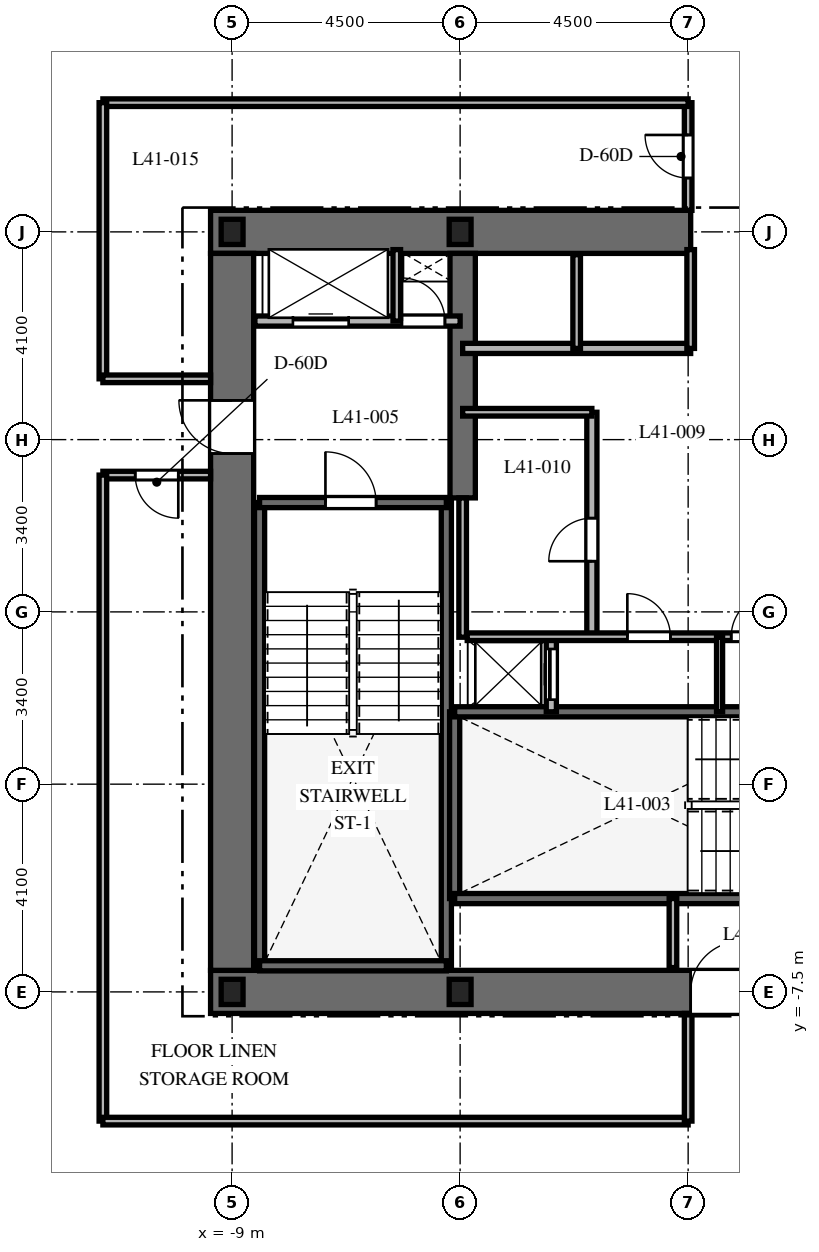
"""IFC4 building model, lengths in metres.
Left out: names, types, materials, properties, quantities, classifications, styles, units other than length and angle.
Written with IfcOpenShell. Run it as: python <this file> out.ifc"""

import sys

from ifc_helpers import new_model, si_unit, direction, frame, frame_2d, origin, origin_2d, place, context, subcontext, project, spatial, rectangle, i_section, extrude, element, fill, save


model = new_model("IFC4")
c1 = context("Model", 3, precision=1e-05, world=origin(), true_north=direction((0.0, 1.0)))
c2 = subcontext(c1, "Body", "Model", "MODEL_VIEW")
j1 = project(units=[si_unit("LENGTHUNIT", "METRE"), si_unit("PLANEANGLEUNIT", "RADIAN")], contexts=[c1])
p1 = place(None, origin())
s1 = spatial("IfcSite", under=j1, at=p1, CompositionType="ELEMENT")
p2 = place(p1, origin())
s2 = spatial("IfcBuilding", under=s1, at=p2, CompositionType="ELEMENT")
p3 = place(p2, frame((0.0, 0.0, 166.5)))
s3 = spatial("IfcBuildingStorey", under=s2, at=p3, CompositionType="ELEMENT", Elevation=166.5)
p4 = place(p3, frame((-9.425, -7.5, 0.0), z_axis=(0.0, 0.0, 1.0), x_axis=(1.0, 0.0, 0.0)))
e1 = element("IfcWall", 1, at=p4, inside=s3, PredefinedType="SHEAR", context=c2, shape_type="SweptSolid", body=[
    extrude(rectangle(XDim=18.85, YDim=0.85, at=frame_2d((9.425, 0.0))), origin(), (0.0, 0.0, 1.0), 3.7),
])
p5 = place(p4, frame((9.475, 0.0, 0.0)))
e2 = element("IfcOpeningElement", 2, at=p5, cuts=e1, PredefinedType="OPENING", context=c2, shape_type="SweptSolid", body=[
    extrude(rectangle(XDim=1.0, YDim=2.15, at=frame_2d((0.5, 1.075))), frame((0.0, 0.435, 0.0), z_axis=(0.0, -1.0, 0.0), x_axis=(1.0, 0.0, 0.0)), (0.0, 0.0, 1.0), 0.87),
])
p6 = place(p3, frame((-9.425, 7.5, 0.0), z_axis=(0.0, 0.0, 1.0), x_axis=(1.0, 0.0, 0.0)))
e3 = element("IfcWall", 3, at=p6, inside=s3, PredefinedType="SHEAR", context=c2, shape_type="SweptSolid", body=[
    extrude(rectangle(XDim=9.475, YDim=0.85, at=frame_2d((4.738, 0.0))), origin(), (0.0, 0.0, 1.0), 3.7),
])
p7 = place(p3, frame((-9.0, -7.075, 0.0), z_axis=(0.0, 0.0, 1.0), x_axis=(0.0, 1.0, 0.0)))
e4 = element("IfcWall", 4, at=p7, inside=s3, PredefinedType="SHEAR", context=c2, shape_type="SweptSolid", body=[
    extrude(rectangle(XDim=14.15, YDim=0.85, at=frame_2d((7.075, 0.0))), origin(), (0.0, 0.0, 1.0), 3.7),
])
p8 = place(p7, frame((10.2, 0.0, 0.0)))
e5 = element("IfcOpeningElement", 5, at=p8, cuts=e4, PredefinedType="OPENING", context=c2, shape_type="SweptSolid", body=[
    extrude(rectangle(XDim=1.05, YDim=2.15, at=frame_2d((0.525, 1.075))), frame((0.0, 0.435, 0.0), z_axis=(0.0, -1.0, 0.0), x_axis=(1.0, 0.0, 0.0)), (0.0, 0.0, 1.0), 0.87),
])
p9 = place(p3, frame((-4.45, 2.25, 0.0), z_axis=(0.0, 0.0, 1.0), x_axis=(0.0, 1.0, 0.0)))
e6 = element("IfcWall", 6, at=p9, inside=s3, PredefinedType="SHEAR", context=c2, shape_type="SweptSolid", body=[
    extrude(rectangle(XDim=4.825, YDim=0.5, at=frame_2d((2.413, 0.0))), origin(), (0.0, 0.0, 1.0), 3.7),
])
for number, where, z_axis, x_axis in (
    (7, (-8.458, -6.985, 0.0), (0.0, 0.0, 1.0), (0.0, 1.0, 0.0)),
    (8, (-4.772, -6.985, 0.0), (0.0, 0.0, 1.0), (0.0, 1.0, 0.0)),
):
    element("IfcWall", number, at=place(p3, frame(where, z_axis=z_axis, x_axis=x_axis)), inside=s3, PredefinedType="SHEAR", context=c2, shape_type="SweptSolid", body=[
        extrude(rectangle(XDim=9.143, YDim=0.2, at=frame_2d((4.572, 0.0))), origin(), (0.0, 0.0, 1.0), 3.7),
    ])
p10 = place(p3, frame((-8.458, -6.985, 0.0), z_axis=(0.0, 0.0, 1.0), x_axis=(1.0, 0.0, 0.0)))
e9 = element("IfcWall", 9, at=p10, inside=s3, PredefinedType="SHEAR", context=c2, shape_type="SweptSolid", body=[
    extrude(rectangle(XDim=3.686, YDim=0.2, at=frame_2d((1.843, 0.0))), origin(), (0.0, 0.0, 1.0), 3.7),
])
p11 = place(p3, frame((-8.458, 2.158, 0.0), z_axis=(0.0, 0.0, 1.0), x_axis=(1.0, 0.0, 0.0)))
e10 = element("IfcWall", 10, at=p11, inside=s3, PredefinedType="SHEAR", context=c2, shape_type="SweptSolid", body=[
    extrude(rectangle(XDim=3.686, YDim=0.2, at=frame_2d((1.843, 0.0))), origin(), (0.0, 0.0, 1.0), 3.7),
])
p12 = place(p11, frame((1.3, 0.0, 0.0)))
e11 = element("IfcOpeningElement", 11, at=p12, cuts=e10, PredefinedType="OPENING", context=c2, shape_type="SweptSolid", body=[
    extrude(rectangle(XDim=1.0, YDim=2.15, at=frame_2d((0.5, 1.075))), frame((0.0, 0.11, 0.0), z_axis=(0.0, -1.0, 0.0), x_axis=(1.0, 0.0, 0.0)), (0.0, 0.0, 1.0), 0.22),
])
p13 = place(p3, frame((-4.608, -5.658, 0.0), z_axis=(0.0, 0.0, 1.0), x_axis=(0.0, 1.0, 0.0)))
e12 = element("IfcWall", 12, at=p13, inside=s3, PredefinedType="SHEAR", context=c2, shape_type="SweptSolid", body=[
    extrude(rectangle(XDim=3.686, YDim=0.2, at=frame_2d((1.843, 0.0))), origin(), (0.0, 0.0, 1.0), 3.7),
])
p14 = place(p3, frame((-4.608, -5.658, 0.0), z_axis=(0.0, 0.0, 1.0), x_axis=(1.0, 0.0, 0.0)))
e13 = element("IfcWall", 13, at=p14, inside=s3, PredefinedType="SHEAR", context=c2, shape_type="SweptSolid", body=[
    extrude(rectangle(XDim=9.166, YDim=0.2, at=frame_2d((4.583, 0.0))), origin(), (0.0, 0.0, 1.0), 3.7),
])
p15 = place(p14, frame((7.45, 0.0, 0.0)))
e14 = element("IfcOpeningElement", 14, at=p15, cuts=e13, PredefinedType="OPENING", context=c2, shape_type="SweptSolid", body=[
    extrude(rectangle(XDim=1.0, YDim=2.15, at=frame_2d((0.5, 1.075))), frame((0.0, 0.11, 0.0), z_axis=(0.0, -1.0, 0.0), x_axis=(1.0, 0.0, 0.0)), (0.0, 0.0, 1.0), 0.22),
])
p16 = place(p3, frame((-4.608, -1.972, 0.0), z_axis=(0.0, 0.0, 1.0), x_axis=(1.0, 0.0, 0.0)))
e15 = element("IfcWall", 15, at=p16, inside=s3, PredefinedType="SHEAR", context=c2, shape_type="SweptSolid", body=[
    extrude(rectangle(XDim=9.166, YDim=0.2, at=frame_2d((4.583, 0.0))), origin(), (0.0, 0.0, 1.0), 3.7),
])
for number, where, z_axis, x_axis in (
    (16, (-9.0, -7.5, 0.0), (0.0, 0.0, 1.0), (1.0, 0.0, 0.0)),
    (17, (-4.5, -7.5, 0.0), (0.0, 0.0, 1.0), (1.0, 0.0, 0.0)),
    (18, (-4.5, 7.5, 0.0), (0.0, 0.0, 1.0), (1.0, 0.0, 0.0)),
    (19, (-9.0, 7.5, 0.0), (0.0, 0.0, 1.0), (1.0, 0.0, 0.0)),
):
    element("IfcColumn", number, at=place(p3, frame(where, z_axis=z_axis, x_axis=x_axis)), inside=s3, PredefinedType="COLUMN", context=c2, shape_type="SweptSolid", body=[
        extrude(i_section(OverallWidth=0.432, OverallDepth=0.498, WebThickness=0.056, FlangeThickness=0.089, at=origin_2d()), origin(), (0.0, 0.0, 1.0), 3.7),
    ])
p17 = place(p3, frame((-0.3, -7.02, 0.0), z_axis=(0.0, 0.0, 1.0), x_axis=(0.0, 1.0, 0.0)))
e20 = element("IfcWall", 20, at=p17, inside=s3, PredefinedType="PARTITIONING", context=c2, shape_type="SweptSolid", body=[
    extrude(rectangle(XDim=1.362, YDim=0.15, at=frame_2d((0.681, 0.0))), origin(), (0.0, 0.0, 1.0), 3.38),
])
p18 = place(p3, frame((-8.55, 5.74, 0.0), z_axis=(0.0, 0.0, 1.0), x_axis=(1.0, 0.0, 0.0)))
e21 = element("IfcWall", 21, at=p18, inside=s3, PredefinedType="PARTITIONING", context=c2, shape_type="SweptSolid", body=[
    extrude(rectangle(XDim=4.05, YDim=0.2, at=frame_2d((2.025, 0.0))), origin(), (0.0, 0.0, 1.0), 3.38),
])
p19 = place(p18, frame((0.75, 0.0, 0.0)))
e22 = element("IfcOpeningElement", 22, at=p19, cuts=e21, PredefinedType="OPENING", context=c2, shape_type="SweptSolid", body=[
    extrude(rectangle(XDim=1.1, YDim=2.2, at=frame_2d((0.55, 1.1))), frame((0.0, 0.11, 0.0), z_axis=(0.0, -1.0, 0.0), x_axis=(1.0, 0.0, 0.0)), (0.0, 0.0, 1.0), 0.22),
])
p20 = place(p18, frame((2.9, 0.0, 0.0)))
e23 = element("IfcOpeningElement", 23, at=p20, cuts=e21, PredefinedType="OPENING", context=c2, shape_type="SweptSolid", body=[
    extrude(rectangle(XDim=0.85, YDim=2.03, at=frame_2d((0.425, 1.015))), frame((0.0, 0.11, 0.0), z_axis=(0.0, -1.0, 0.0), x_axis=(1.0, 0.0, 0.0)), (0.0, 0.0, 1.0), 0.22),
])
p21 = place(p3, frame((-5.75, 5.74, 0.0), z_axis=(0.0, 0.0, 1.0), x_axis=(0.0, 1.0, 0.0)))
e24 = element("IfcWall", 24, at=p21, inside=s3, PredefinedType="PARTITIONING", context=c2, shape_type="SweptSolid", body=[
    extrude(rectangle(XDim=1.41, YDim=0.15, at=frame_2d((0.705, 0.0))), origin(), (0.0, 0.0, 1.0), 3.38),
])
p22 = place(p3, frame((-2.7, -1.972, 0.0), z_axis=(0.0, 0.0, 1.0), x_axis=(0.0, 1.0, 0.0)))
e25 = element("IfcWall", 25, at=p22, inside=s3, PredefinedType="PARTITIONING", context=c2, shape_type="SweptSolid", body=[
    extrude(rectangle(XDim=1.472, YDim=0.2, at=frame_2d((0.736, 0.0))), origin(), (0.0, 0.0, 1.0), 3.38),
])
p23 = place(p22, frame((0.24, 0.0, 0.0)))
e26 = element("IfcOpeningElement", 26, at=p23, cuts=e25, PredefinedType="OPENING", context=c2, shape_type="SweptSolid", body=[
    extrude(rectangle(XDim=1.0, YDim=2.2, at=frame_2d((0.5, 1.1))), frame((0.0, 0.11, 0.0), z_axis=(0.0, -1.0, 0.0), x_axis=(1.0, 0.0, 0.0)), (0.0, 0.0, 1.0), 0.22),
])
p24 = place(p3, frame((-4.45, 5.2, 0.0), z_axis=(0.0, 0.0, 1.0), x_axis=(1.0, 0.0, 0.0)))
e27 = element("IfcWall", 27, at=p24, inside=s3, PredefinedType="PARTITIONING", context=c2, shape_type="SweptSolid", body=[
    extrude(rectangle(XDim=4.5, YDim=0.2, at=frame_2d((2.25, 0.0))), origin(), (0.0, 0.0, 1.0), 3.38),
])
p25 = place(p3, frame((-2.2, 5.2, 0.0), z_axis=(0.0, 0.0, 1.0), x_axis=(0.0, 1.0, 0.0)))
e28 = element("IfcWall", 28, at=p25, inside=s3, PredefinedType="PARTITIONING", context=c2, shape_type="SweptSolid", body=[
    extrude(rectangle(XDim=1.85, YDim=0.15, at=frame_2d((0.925, 0.0))), origin(), (0.0, 0.0, 1.0), 3.38),
])
p26 = place(p3, frame((0.05, 5.2, 0.0), z_axis=(0.0, 0.0, 1.0), x_axis=(0.0, 1.0, 0.0)))
e29 = element("IfcWall", 29, at=p26, inside=s3, PredefinedType="PARTITIONING", context=c2, shape_type="SweptSolid", body=[
    extrude(rectangle(XDim=1.95, YDim=0.15, at=frame_2d((0.975, 0.0))), origin(), (0.0, 0.0, 1.0), 3.38),
])
p27 = place(p3, frame((-4.45, -0.5, 0.0), z_axis=(0.0, 0.0, 1.0), x_axis=(0.0, 1.0, 0.0)))
e30 = element("IfcWall", 30, at=p27, inside=s3, PredefinedType="PARTITIONING", context=c2, shape_type="SweptSolid", body=[
    extrude(rectangle(XDim=2.75, YDim=0.15, at=frame_2d((1.375, 0.0))), origin(), (0.0, 0.0, 1.0), 3.38),
])
p28 = place(p3, frame((-1.9, -0.5, 0.0), z_axis=(0.0, 0.0, 1.0), x_axis=(0.0, 1.0, 0.0)))
e31 = element("IfcWall", 31, at=p28, inside=s3, PredefinedType="PARTITIONING", context=c2, shape_type="SweptSolid", body=[
    extrude(rectangle(XDim=4.44, YDim=0.2, at=frame_2d((2.22, 0.0))), origin(), (0.0, 0.0, 1.0), 3.38),
])
p29 = place(p28, frame((1.5, 0.0, 0.0)))
e32 = element("IfcOpeningElement", 32, at=p29, cuts=e31, PredefinedType="OPENING", context=c2, shape_type="SweptSolid", body=[
    extrude(rectangle(XDim=0.85, YDim=2.03, at=frame_2d((0.425, 1.015))), frame((0.0, 0.11, 0.0), z_axis=(0.0, -1.0, 0.0), x_axis=(1.0, 0.0, 0.0)), (0.0, 0.0, 1.0), 0.22),
])
p30 = place(p3, frame((-4.45, 3.94, 0.0), z_axis=(0.0, 0.0, 1.0), x_axis=(1.0, 0.0, 0.0)))
e33 = element("IfcWall", 33, at=p30, inside=s3, PredefinedType="PARTITIONING", context=c2, shape_type="SweptSolid", body=[
    extrude(rectangle(XDim=2.55, YDim=0.15, at=frame_2d((1.275, 0.0))), origin(), (0.0, 0.0, 1.0), 3.38),
])
p31 = place(p3, frame((-4.36, -0.49, 0.0), z_axis=(0.0, 0.0, 1.0), x_axis=(1.0, 0.0, 0.0)))
e34 = element("IfcWall", 34, at=p31, inside=s3, PredefinedType="PARTITIONING", context=c2, shape_type="SweptSolid", body=[
    extrude(rectangle(XDim=8.72, YDim=0.15, at=frame_2d((4.36, 0.0))), origin(), (0.0, 0.0, 1.0), 3.38),
])
p32 = place(p31, frame((3.16, 0.0, 0.0)))
e35 = element("IfcOpeningElement", 35, at=p32, cuts=e34, PredefinedType="OPENING", context=c2, shape_type="SweptSolid", body=[
    extrude(rectangle(XDim=0.85, YDim=2.03, at=frame_2d((0.425, 1.015))), frame((0.0, 0.085, 0.0), z_axis=(0.0, -1.0, 0.0), x_axis=(1.0, 0.0, 0.0)), (0.0, 0.0, 1.0), 0.17),
])
p33 = place(p31, frame((5.21, 0.0, 0.0)))
e36 = element("IfcOpeningElement", 36, at=p33, cuts=e34, PredefinedType="OPENING", context=c2, shape_type="SweptSolid", body=[
    extrude(rectangle(XDim=0.85, YDim=2.03, at=frame_2d((0.425, 1.015))), frame((0.0, 0.085, 0.0), z_axis=(0.0, -1.0, 0.0), x_axis=(1.0, 0.0, 0.0)), (0.0, 0.0, 1.0), 0.17),
])
p34 = place(p3, frame((0.62, -1.972, 0.0), z_axis=(0.0, 0.0, 1.0), x_axis=(0.0, 1.0, 0.0)))
e37 = element("IfcWall", 37, at=p34, inside=s3, PredefinedType="PARTITIONING", context=c2, shape_type="SweptSolid", body=[
    extrude(rectangle(XDim=1.472, YDim=0.12, at=frame_2d((0.736, 0.0))), origin(), (0.0, 0.0, 1.0), 3.38),
])
p35 = place(p3, frame((0.0, 7.925, 0.0), z_axis=(0.0, 0.0, 1.0), x_axis=(0.0, 1.0, 0.0)))
e38 = element("IfcWall", 38, at=p35, inside=s3, PredefinedType="PARTITIONING", context=c2, shape_type="SweptSolid", body=[
    extrude(rectangle(XDim=2.125, YDim=0.15, at=frame_2d((1.062, 0.0))), origin(), (0.0, 0.0, 1.0), 3.38),
])
p36 = place(p35, frame((0.638, 0.0, 0.0)))
e39 = element("IfcOpeningElement", 39, at=p36, cuts=e38, PredefinedType="OPENING", context=c2, shape_type="SweptSolid", body=[
    extrude(rectangle(XDim=0.85, YDim=2.03, at=frame_2d((0.425, 1.015))), frame((0.0, 0.085, 0.0), z_axis=(0.0, -1.0, 0.0), x_axis=(1.0, 0.0, 0.0)), (0.0, 0.0, 1.0), 0.17),
])
p37 = place(p3, frame((0.0, 10.05, 0.0), z_axis=(0.0, 0.0, 1.0), x_axis=(-1.0, 0.0, 0.0)))
e40 = element("IfcWall", 40, at=p37, inside=s3, PredefinedType="PARTITIONING", context=c2, shape_type="SweptSolid", body=[
    extrude(rectangle(XDim=11.55, YDim=0.15, at=frame_2d((5.775, 0.0))), origin(), (0.0, 0.0, 1.0), 2.82),
])
p38 = place(p3, frame((-11.55, 10.05, 0.0), z_axis=(0.0, 0.0, 1.0), x_axis=(0.0, -1.0, 0.0)))
e41 = element("IfcWall", 41, at=p38, inside=s3, PredefinedType="PARTITIONING", context=c2, shape_type="SweptSolid", body=[
    extrude(rectangle(XDim=5.45, YDim=0.15, at=frame_2d((2.725, 0.0))), origin(), (0.0, 0.0, 1.0), 2.82),
])
p39 = place(p3, frame((-11.55, 4.6, 0.0), z_axis=(0.0, 0.0, 1.0), x_axis=(1.0, 0.0, 0.0)))
e42 = element("IfcWall", 42, at=p39, inside=s3, PredefinedType="PARTITIONING", context=c2, shape_type="SweptSolid", body=[
    extrude(rectangle(XDim=2.125, YDim=0.15, at=frame_2d((1.062, 0.0))), origin(), (0.0, 0.0, 1.0), 3.38),
])
p40 = place(p3, frame((-9.425, 2.7, 0.0), z_axis=(0.0, 0.0, 1.0), x_axis=(-1.0, 0.0, 0.0)))
e43 = element("IfcWall", 43, at=p40, inside=s3, PredefinedType="PARTITIONING", context=c2, shape_type="SweptSolid", body=[
    extrude(rectangle(XDim=2.125, YDim=0.15, at=frame_2d((1.062, 0.0))), origin(), (0.0, 0.0, 1.0), 3.38),
])
p41 = place(p40, frame((0.637, 0.0, 0.0)))
e44 = element("IfcOpeningElement", 44, at=p41, cuts=e43, PredefinedType="OPENING", context=c2, shape_type="SweptSolid", body=[
    extrude(rectangle(XDim=0.85, YDim=2.03, at=frame_2d((0.425, 1.015))), frame((0.0, 0.085, 0.0), z_axis=(0.0, -1.0, 0.0), x_axis=(1.0, 0.0, 0.0)), (0.0, 0.0, 1.0), 0.17),
])
p42 = place(p3, frame((-11.55, 2.7, 0.0), z_axis=(0.0, 0.0, 1.0), x_axis=(0.0, -1.0, 0.0)))
e45 = element("IfcWall", 45, at=p42, inside=s3, PredefinedType="PARTITIONING", context=c2, shape_type="SweptSolid", body=[
    extrude(rectangle(XDim=12.75, YDim=0.15, at=frame_2d((6.375, 0.0))), origin(), (0.0, 0.0, 1.0), 2.82),
])
p43 = place(p3, frame((-11.55, -10.05, 0.0), z_axis=(0.0, 0.0, 1.0), x_axis=(1.0, 0.0, 0.0)))
e46 = element("IfcWall", 46, at=p43, inside=s3, PredefinedType="PARTITIONING", context=c2, shape_type="SweptSolid", body=[
    extrude(rectangle(XDim=11.55, YDim=0.15, at=frame_2d((5.775, 0.0))), origin(), (0.0, 0.0, 1.0), 2.82),
])
p44 = place(p3, frame((0.0, -10.05, 0.0), z_axis=(0.0, 0.0, 1.0), x_axis=(0.0, 1.0, 0.0)))
e47 = element("IfcWall", 47, at=p44, inside=s3, PredefinedType="PARTITIONING", context=c2, shape_type="SweptSolid", body=[
    extrude(rectangle(XDim=2.125, YDim=0.15, at=frame_2d((1.062, 0.0))), origin(), (0.0, 0.0, 1.0), 3.38),
])
p45 = place(p12, origin())
e48 = element("IfcDoor", 48, at=p45, inside=s3, OperationType="SINGLE_SWING_LEFT", PredefinedType="DOOR", context=c2, shape_type="SweptSolid", body=[
    extrude(rectangle(XDim=1.0, YDim=2.15, at=frame_2d((0.5, 1.075))), frame((0.0, 0.025, 0.0), z_axis=(0.0, -1.0, 0.0), x_axis=(1.0, 0.0, 0.0)), (0.0, 0.0, 1.0), 0.05),
])
fill(e11, e48)
p46 = place(p5, origin())
e49 = element("IfcDoor", 49, at=p46, inside=s3, OperationType="SINGLE_SWING_RIGHT", PredefinedType="DOOR", context=c2, shape_type="SweptSolid", body=[
    extrude(rectangle(XDim=1.0, YDim=2.15, at=frame_2d((0.5, 1.075))), frame((0.0, 0.025, 0.0), z_axis=(0.0, -1.0, 0.0), x_axis=(1.0, 0.0, 0.0)), (0.0, 0.0, 1.0), 0.05),
])
fill(e2, e49)
p47 = place(p8, origin())
e50 = element("IfcDoor", 50, at=p47, inside=s3, OperationType="SINGLE_SWING_RIGHT", PredefinedType="DOOR", context=c2, shape_type="SweptSolid", body=[
    extrude(rectangle(XDim=1.05, YDim=2.15, at=frame_2d((0.525, 1.075))), frame((0.0, 0.025, 0.0), z_axis=(0.0, -1.0, 0.0), x_axis=(1.0, 0.0, 0.0)), (0.0, 0.0, 1.0), 0.05),
])
fill(e5, e50)
p48 = place(p19, origin())
e51 = element("IfcDoor", 51, at=p48, inside=s3, OperationType="SLIDING_TO_LEFT", PredefinedType="DOOR", context=c2, shape_type="SweptSolid", body=[
    extrude(rectangle(XDim=1.1, YDim=2.2, at=frame_2d((0.55, 1.1))), frame((0.0, 0.025, 0.0), z_axis=(0.0, -1.0, 0.0), x_axis=(1.0, 0.0, 0.0)), (0.0, 0.0, 1.0), 0.05),
])
fill(e22, e51)
p49 = place(p20, origin())
e52 = element("IfcDoor", 52, at=p49, inside=s3, OperationType="SINGLE_SWING_LEFT", PredefinedType="DOOR", context=c2, shape_type="SweptSolid", body=[
    extrude(rectangle(XDim=0.85, YDim=2.03, at=frame_2d((0.425, 1.015))), frame((0.0, 0.025, 0.0), z_axis=(0.0, -1.0, 0.0), x_axis=(1.0, 0.0, 0.0)), (0.0, 0.0, 1.0), 0.05),
])
fill(e23, e52)
p50 = place(p23, origin())
e53 = element("IfcDoor", 53, at=p50, inside=s3, OperationType="SLIDING_TO_LEFT", PredefinedType="DOOR", context=c2, shape_type="SweptSolid", body=[
    extrude(rectangle(XDim=1.0, YDim=2.2, at=frame_2d((0.5, 1.1))), frame((0.0, 0.025, 0.0), z_axis=(0.0, -1.0, 0.0), x_axis=(1.0, 0.0, 0.0)), (0.0, 0.0, 1.0), 0.05),
])
fill(e26, e53)
p51 = place(p29, origin())
e54 = element("IfcDoor", 54, at=p51, inside=s3, OperationType="SINGLE_SWING_LEFT", PredefinedType="DOOR", context=c2, shape_type="SweptSolid", body=[
    extrude(rectangle(XDim=0.85, YDim=2.03, at=frame_2d((0.425, 1.015))), frame((0.0, 0.025, 0.0), z_axis=(0.0, -1.0, 0.0), x_axis=(1.0, 0.0, 0.0)), (0.0, 0.0, 1.0), 0.05),
])
fill(e32, e54)
p52 = place(p32, origin())
e55 = element("IfcDoor", 55, at=p52, inside=s3, OperationType="SINGLE_SWING_LEFT", PredefinedType="DOOR", context=c2, shape_type="SweptSolid", body=[
    extrude(rectangle(XDim=0.85, YDim=2.03, at=frame_2d((0.425, 1.015))), frame((0.0, 0.025, 0.0), z_axis=(0.0, -1.0, 0.0), x_axis=(1.0, 0.0, 0.0)), (0.0, 0.0, 1.0), 0.05),
])
fill(e35, e55)
p53 = place(p33, origin())
e56 = element("IfcDoor", 56, at=p53, inside=s3, OperationType="SINGLE_SWING_RIGHT", PredefinedType="DOOR", context=c2, shape_type="SweptSolid", body=[
    extrude(rectangle(XDim=0.85, YDim=2.03, at=frame_2d((0.425, 1.015))), frame((0.0, 0.025, 0.0), z_axis=(0.0, -1.0, 0.0), x_axis=(1.0, 0.0, 0.0)), (0.0, 0.0, 1.0), 0.05),
])
fill(e36, e56)
p54 = place(p41, origin())
e57 = element("IfcDoor", 57, at=p54, inside=s3, OperationType="SINGLE_SWING_LEFT", PredefinedType="DOOR", context=c2, shape_type="SweptSolid", body=[
    extrude(rectangle(XDim=0.85, YDim=2.03, at=frame_2d((0.425, 1.015))), frame((0.0, 0.025, 0.0), z_axis=(0.0, -1.0, 0.0), x_axis=(1.0, 0.0, 0.0)), (0.0, 0.0, 1.0), 0.05),
])
fill(e44, e57)
p55 = place(p36, origin())
e58 = element("IfcDoor", 58, at=p55, inside=s3, OperationType="SINGLE_SWING_RIGHT", PredefinedType="DOOR", context=c2, shape_type="SweptSolid", body=[
    extrude(rectangle(XDim=0.85, YDim=2.03, at=frame_2d((0.425, 1.015))), frame((0.0, 0.025, 0.0), z_axis=(0.0, -1.0, 0.0), x_axis=(1.0, 0.0, 0.0)), (0.0, 0.0, 1.0), 0.05),
])
fill(e39, e58)
save(model, sys.argv[1])
